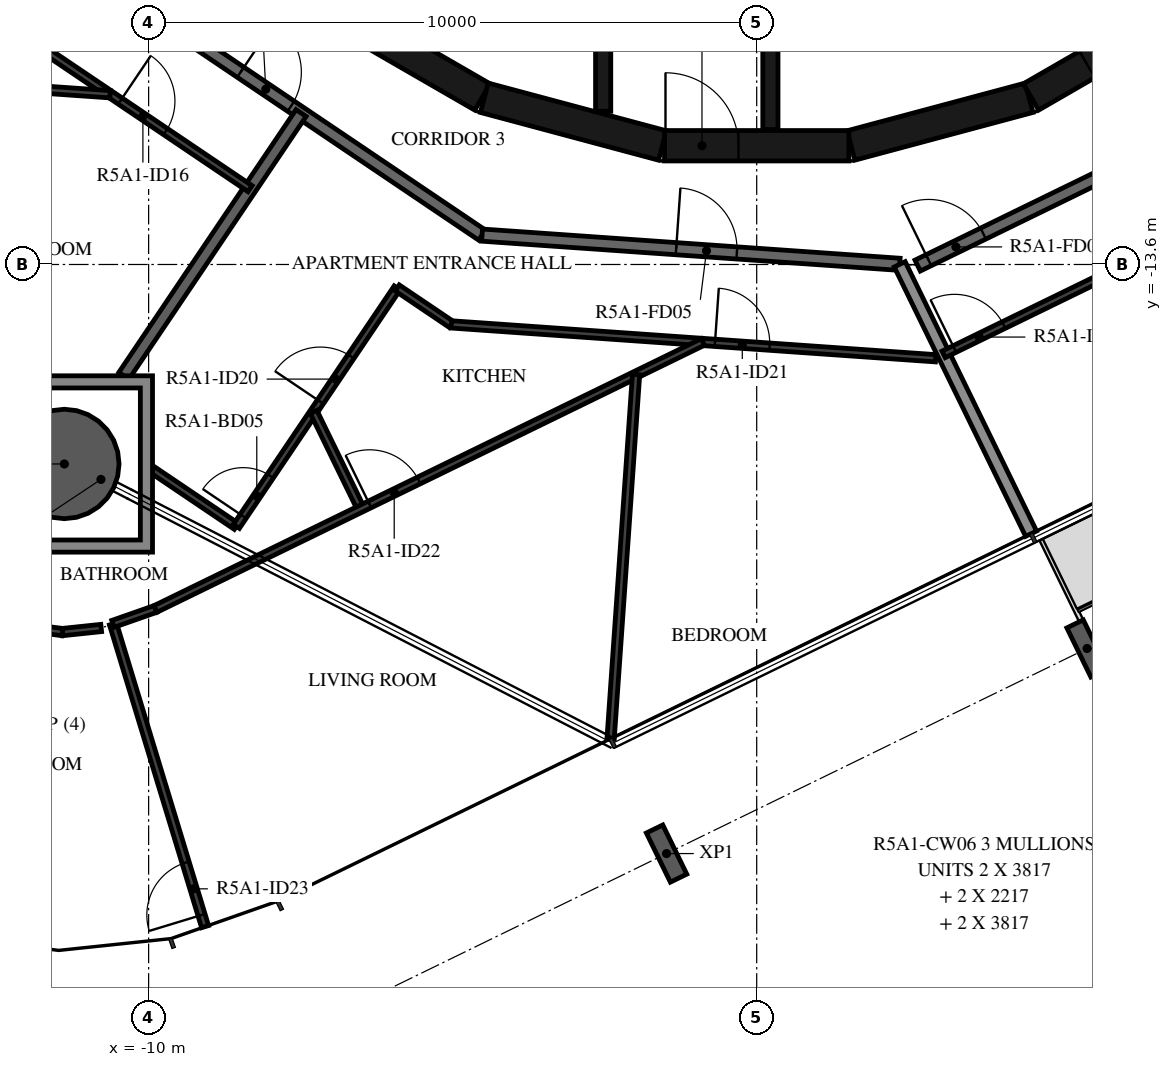
"""IFC4 building model, lengths in metres.
Left out: names, types, materials, properties, quantities, classifications, styles, units other than length and angle.
Written with IfcOpenShell. Run it as: python <this file> out.ifc"""

import sys

from ifc_helpers import new_model, si_unit, direction, frame, frame_2d, origin, origin_2d, place, context, subcontext, project, spatial, polyline, rectangle, hollow_circle, i_section, outline, extrude, element, fill, save


model = new_model("IFC4")
c1 = context("Model", 3, precision=1e-05, world=origin(), true_north=direction((0.0, 1.0)))
c2 = subcontext(c1, "Body", "Model", "MODEL_VIEW")
j1 = project(units=[si_unit("LENGTHUNIT", "METRE"), si_unit("PLANEANGLEUNIT", "RADIAN")], contexts=[c1])
p1 = place(None, origin())
s1 = spatial("IfcSite", under=j1, at=p1, CompositionType="ELEMENT")
p2 = place(p1, origin())
s2 = spatial("IfcBuilding", under=s1, at=p2, CompositionType="ELEMENT")
p3 = place(p2, frame((0.0, 0.0, 191.9)))
s3 = spatial("IfcBuildingStorey", under=s2, at=p3, CompositionType="ELEMENT", Elevation=191.9)
p4 = place(p3, frame((-11.386, -16.881, -0.38), z_axis=(0.0, 0.0, 1.0), x_axis=(1.0, 0.0, 0.0)))
e1 = element("IfcColumn", 1, at=p4, inside=s3, PredefinedType="COLUMN", context=c2, shape_type="SweptSolid", body=[
    extrude(hollow_circle(Radius=0.9, WallThickness=0.04, at=origin_2d()), origin(), (0.0, 0.0, 1.0), 3.5),
])
for number, where, z_axis, x_axis in (
    (2, (-1.482, -23.287, -0.38), (0.0, 0.0, 1.0), (-0.899, -0.438, 0.0)),
    (3, (5.433, -19.915, -0.38), (0.0, 0.0, 1.0), (-0.899, -0.438, 0.0)),
):
    element("IfcColumn", number, at=place(p3, frame(where, z_axis=z_axis, x_axis=x_axis)), inside=s3, PredefinedType="COLUMN", context=c2, shape_type="SweptSolid", body=[
        extrude(i_section(OverallWidth=0.3, OverallDepth=0.9, WebThickness=0.019, FlangeThickness=0.035, FilletRadius=0.03, at=origin_2d()), origin(), (0.0, 0.0, 1.0), 3.5),
    ])
p5 = place(p3, frame((1.55, -11.643, 0.0), z_axis=(0.0, 0.0, 1.0), x_axis=(0.965948410781, 0.258734743916, 0.0)))
e4 = element("IfcWall", 4, at=p5, inside=s3, PredefinedType="SHEAR", context=c2, shape_type="SweptSolid", body=[
    extrude(rectangle(XDim=3.033, YDim=0.5, at=frame_2d((1.516, 0.0))), origin(), (0.0, 0.0, 1.0), 3.12),
])
p6 = place(p3, frame((4.51, -10.845, 0.0), z_axis=(0.0, 0.0, 1.0), x_axis=(0.865975092491, 0.500087131594, 0.0)))
e5 = element("IfcWall", 5, at=p6, inside=s3, PredefinedType="SHEAR", context=c2, shape_type="SweptSolid", body=[
    extrude(rectangle(XDim=3.033, YDim=0.5, at=frame_2d((1.516, 0.0))), origin(), (0.0, 0.0, 1.0), 3.12),
])
p7 = place(p6, frame((1.066, 0.0, 0.0)))
e6 = element("IfcOpeningElement", 6, at=p7, cuts=e5, PredefinedType="OPENING", context=c2, shape_type="SweptSolid", body=[
    extrude(rectangle(XDim=0.9, YDim=2.1, at=frame_2d((0.45, 1.05))), frame((0.0, 0.26, 0.0), z_axis=(0.0, -1.0, 0.0), x_axis=(1.0, 0.0, 0.0)), (0.0, 0.0, 1.0), 0.52),
])
for number, where, z_axis, x_axis in (
    (7, (-7.137, -9.329, 0.0), (0.0, 0.0, 1.0), (0.866, -0.5, 0.0)),
    (8, (-4.479, -10.858, 0.0), (0.0, 0.0, 1.0), (0.966, -0.259, 0.0)),
):
    element("IfcWall", number, at=place(p3, frame(where, z_axis=z_axis, x_axis=x_axis)), inside=s3, PredefinedType="SHEAR", context=c2, shape_type="SweptSolid", body=[
        extrude(rectangle(XDim=3.033, YDim=0.5, at=frame_2d((1.516, 0.0))), origin(), (0.0, 0.0, 1.0), 3.12),
    ])
p8 = place(p3, frame((-1.516, -11.647, 0.0), z_axis=(0.0, 0.0, 1.0), x_axis=(1.0, 0.0, 0.0)))
e9 = element("IfcWall", 9, at=p8, inside=s3, PredefinedType="SHEAR", context=c2, shape_type="SweptSolid", body=[
    extrude(rectangle(XDim=3.033, YDim=0.5, at=frame_2d((1.516, 0.0))), origin(), (0.0, 0.0, 1.0), 3.12),
])
p9 = place(p8, frame((0.016, 0.0, 0.0)))
e10 = element("IfcOpeningElement", 10, at=p9, cuts=e9, PredefinedType="OPENING", context=c2, shape_type="SweptSolid", body=[
    extrude(rectangle(XDim=1.2, YDim=2.1, at=frame_2d((0.6, 1.05))), frame((0.0, 0.26, 0.0), z_axis=(0.0, -1.0, 0.0), x_axis=(1.0, 0.0, 0.0)), (0.0, 0.0, 1.0), 0.52),
])
p10 = place(p3, frame((-2.525, -8.97, 0.0), z_axis=(0.0, 0.0, 1.0), x_axis=(0.0, -1.0, 0.0)))
e11 = element("IfcWall", 11, at=p10, inside=s3, PredefinedType="SHEAR", context=c2, shape_type="SweptSolid", body=[
    extrude(rectangle(XDim=2.11, YDim=0.25, at=frame_2d((1.055, 0.0))), origin(), (0.0, 0.0, 1.0), 3.12),
])
p11 = place(p3, frame((0.225, -8.97, 0.0), z_axis=(0.0, 0.0, 1.0), x_axis=(0.0, -1.0, 0.0)))
e12 = element("IfcWall", 12, at=p11, inside=s3, PredefinedType="SHEAR", context=c2, shape_type="SweptSolid", body=[
    extrude(rectangle(XDim=2.41, YDim=0.25, at=frame_2d((1.205, 0.0))), origin(), (0.0, 0.0, 1.0), 3.12),
])
p12 = place(p3, frame((-10.47, -9.101, 0.0), z_axis=(0.0, 0.0, 1.0), x_axis=(0.829035841718, -0.559195469534, 0.0)))
e13 = element("IfcWall", 13, at=p12, inside=s3, PredefinedType="STANDARD", context=c2, shape_type="SweptSolid", body=[
    extrude(rectangle(XDim=7.181, YDim=0.2, at=frame_2d((3.591, 0.0))), origin(), (0.0, 0.0, 1.0), 3.12),
])
p13 = place(p12, frame((2.39, 0.0, 0.0)))
e14 = element("IfcOpeningElement", 14, at=p13, cuts=e13, PredefinedType="OPENING", context=c2, shape_type="SweptSolid", body=[
    extrude(rectangle(XDim=1.0, YDim=2.1, at=frame_2d((0.5, 1.05))), frame((0.0, 0.11, 0.0), z_axis=(0.0, -1.0, 0.0), x_axis=(1.0, 0.0, 0.0)), (0.0, 0.0, 1.0), 0.22),
])
p14 = place(p3, frame((-4.517, -13.117, 0.0), z_axis=(0.0, 0.0, 1.0), x_axis=(0.997564669554, -0.069747616856, 0.0)))
e15 = element("IfcWall", 15, at=p14, inside=s3, PredefinedType="STANDARD", context=c2, shape_type="SweptSolid", body=[
    extrude(rectangle(XDim=6.885, YDim=0.2, at=frame_2d((3.443, 0.0))), origin(), (0.0, 0.0, 1.0), 3.12),
])
p15 = place(p14, frame((3.2, 0.0, 0.0)))
e16 = element("IfcOpeningElement", 16, at=p15, cuts=e15, PredefinedType="OPENING", context=c2, shape_type="SweptSolid", body=[
    extrude(rectangle(XDim=1.0, YDim=2.1, at=frame_2d((0.5, 1.05))), frame((0.0, 0.11, 0.0), z_axis=(0.0, -1.0, 0.0), x_axis=(1.0, 0.0, 0.0)), (0.0, 0.0, 1.0), 0.22),
])
p16 = place(p3, frame((2.647, -13.618, 0.0), z_axis=(0.0, 0.0, 1.0), x_axis=(0.898796543751, 0.438366026218, 0.0)))
e17 = element("IfcWall", 17, at=p16, inside=s3, PredefinedType="STANDARD", context=c2, shape_type="SweptSolid", body=[
    extrude(rectangle(XDim=7.181, YDim=0.2, at=frame_2d((3.591, 0.0))), origin(), (0.0, 0.0, 1.0), 3.12),
])
p17 = place(p16, frame((0.2, 0.0, 0.0)))
e18 = element("IfcOpeningElement", 18, at=p17, cuts=e17, PredefinedType="OPENING", context=c2, shape_type="SweptSolid", body=[
    extrude(rectangle(XDim=1.0, YDim=2.1, at=frame_2d((0.5, 1.05))), frame((0.0, 0.11, 0.0), z_axis=(0.0, -1.0, 0.0), x_axis=(1.0, 0.0, 0.0)), (0.0, 0.0, 1.0), 0.22),
])
p18 = place(p3, frame((-10.407, -15.43, 0.0), z_axis=(0.0, 0.0, 1.0), x_axis=(0.559038328133, 0.829141813973, 0.0)))
e19 = element("IfcWall", 19, at=p18, inside=s3, PredefinedType="STANDARD", context=c2, shape_type="SweptSolid", body=[
    extrude(rectangle(XDim=5.212, YDim=0.2, at=frame_2d((2.606, 0.0))), origin(), (0.0, 0.0, 1.0), 3.12),
])
p19 = place(p3, frame((4.512, -18.027, 0.0), z_axis=(0.0, 0.0, 1.0), x_axis=(-0.438374835386, 0.898792247241, 0.0)))
e20 = element("IfcWall", 20, at=p19, inside=s3, PredefinedType="STANDARD", context=c2, shape_type="SweptSolid", body=[
    extrude(rectangle(XDim=4.929, YDim=0.2, at=frame_2d((2.464, 0.0))), origin(), (0.0, 0.0, 1.0), 2.73),
])
p20 = place(p3, frame((-11.642, -10.12, 0.0), z_axis=(0.0, 0.0, 1.0), x_axis=(0.829018066952, -0.559221820629, 0.0)))
e21 = element("IfcWall", 21, at=p20, inside=s3, PredefinedType="PARTITIONING", context=c2, shape_type="SweptSolid", body=[
    extrude(rectangle(XDim=3.992, YDim=0.12, at=frame_2d((1.996, 0.0))), origin(), (0.0, 0.0, 1.0), 3.12),
])
p21 = place(p20, frame((1.417, 0.0, 0.0)))
e22 = element("IfcOpeningElement", 22, at=p21, cuts=e21, PredefinedType="OPENING", context=c2, shape_type="SweptSolid", body=[
    extrude(rectangle(XDim=0.9, YDim=2.1, at=frame_2d((0.45, 1.05))), frame((0.0, 0.07, 0.0), z_axis=(0.0, -1.0, 0.0), x_axis=(1.0, 0.0, 0.0)), (0.0, 0.0, 1.0), 0.14),
])
p22 = place(p3, frame((-14.551, -10.527, 0.0), z_axis=(0.0, 0.0, 1.0), x_axis=(0.997564247633, -0.069753651118, 0.0)))
e23 = element("IfcWall", 23, at=p22, inside=s3, PredefinedType="PARTITIONING", context=c2, shape_type="SweptSolid", body=[
    extrude(rectangle(XDim=3.927, YDim=0.12, at=frame_2d((1.963, 0.0))), origin(), (0.0, 0.0, 1.0), 3.12),
])
p23 = place(p3, frame((-9.936, -16.976, 0.0), z_axis=(0.0, 0.0, 1.0), x_axis=(0.829057888835, -0.559162782167, 0.0)))
e24 = element("IfcWall", 24, at=p23, inside=s3, PredefinedType="PARTITIONING", context=c2, shape_type="SweptSolid", body=[
    extrude(rectangle(XDim=1.664, YDim=0.12, at=frame_2d((0.832, 0.0))), origin(), (0.0, 0.0, 1.0), 3.12),
])
p24 = place(p3, frame((-8.557, -17.906, 0.0), z_axis=(0.0, 0.0, 1.0), x_axis=(0.559194471553, 0.829036514868, 0.0)))
e25 = element("IfcWall", 25, at=p24, inside=s3, PredefinedType="PARTITIONING", context=c2, shape_type="SweptSolid", body=[
    extrude(rectangle(XDim=4.73, YDim=0.12, at=frame_2d((2.365, 0.0))), origin(), (0.0, 0.0, 1.0), 3.12),
])
p25 = place(p24, frame((0.2, 0.0, 0.0)))
e26 = element("IfcOpeningElement", 26, at=p25, cuts=e25, PredefinedType="OPENING", context=c2, shape_type="SweptSolid", body=[
    extrude(rectangle(XDim=0.8, YDim=2.1, at=frame_2d((0.4, 1.05))), frame((0.0, 0.07, 0.0), z_axis=(0.0, -1.0, 0.0), x_axis=(1.0, 0.0, 0.0)), (0.0, 0.0, 1.0), 0.14),
])
p26 = place(p24, frame((2.471, 0.0, 0.0)))
e27 = element("IfcOpeningElement", 27, at=p26, cuts=e25, PredefinedType="OPENING", context=c2, shape_type="SweptSolid", body=[
    extrude(rectangle(XDim=0.9, YDim=2.1, at=frame_2d((0.45, 1.05))), frame((0.0, 0.07, 0.0), z_axis=(0.0, -1.0, 0.0), x_axis=(1.0, 0.0, 0.0)), (0.0, 0.0, 1.0), 0.14),
])
p27 = place(p3, frame((-5.912, -13.985, 0.0), z_axis=(0.0, 0.0, 1.0), x_axis=(0.829027978444, -0.559207127062, 0.0)))
e28 = element("IfcWall", 28, at=p27, inside=s3, PredefinedType="PARTITIONING", context=c2, shape_type="SweptSolid", body=[
    extrude(rectangle(XDim=1.073, YDim=0.12, at=frame_2d((0.537, 0.0))), origin(), (0.0, 0.0, 1.0), 3.12),
])
p28 = place(p3, frame((-5.022, -14.585, 0.0), z_axis=(0.0, 0.0, 1.0), x_axis=(0.997565118395, -0.069741197017, 0.0)))
e29 = element("IfcWall", 29, at=p28, inside=s3, PredefinedType="PARTITIONING", context=c2, shape_type="SweptSolid", body=[
    extrude(rectangle(XDim=7.985, YDim=0.12, at=frame_2d((3.993, 0.0))), origin(), (0.0, 0.0, 1.0), 3.12),
])
p29 = place(p28, frame((4.346, 0.0, 0.0)))
e30 = element("IfcOpeningElement", 30, at=p29, cuts=e29, PredefinedType="OPENING", context=c2, shape_type="SweptSolid", body=[
    extrude(rectangle(XDim=0.9, YDim=2.1, at=frame_2d((0.45, 1.05))), frame((0.0, 0.07, 0.0), z_axis=(0.0, -1.0, 0.0), x_axis=(1.0, 0.0, 0.0)), (0.0, 0.0, 1.0), 0.14),
])
p30 = place(p3, frame((-10.78, -19.578, 0.0), z_axis=(0.0, 0.0, 1.0), x_axis=(-0.994515867502, -0.104585798686, 0.0)))
e31 = element("IfcWall", 31, at=p30, inside=s3, PredefinedType="PARTITIONING", context=c2, shape_type="SweptSolid", body=[
    extrude(rectangle(XDim=0.642, YDim=0.12, at=frame_2d((0.321, 0.0))), origin(), (0.0, 0.0, 1.0), 3.12),
])
p31 = place(p3, frame((-11.418, -19.645, 0.0), z_axis=(0.0, 0.0, 1.0), x_axis=(-0.991802759529, 0.127778269633, 0.0)))
e32 = element("IfcWall", 32, at=p31, inside=s3, PredefinedType="PARTITIONING", context=c2, shape_type="SweptSolid", body=[
    extrude(rectangle(XDim=0.642, YDim=0.12, at=frame_2d((0.321, 0.0))), origin(), (0.0, 0.0, 1.0), 3.12),
])
p32 = place(p3, frame((-9.072, -24.489, 0.0), z_axis=(0.0, 0.0, 1.0), x_axis=(-0.291025348593, 0.956715342449, 0.0)))
e33 = element("IfcWall", 33, at=p32, inside=s3, PredefinedType="PARTITIONING", context=c2, shape_type="SweptSolid", body=[
    extrude(rectangle(XDim=5.205, YDim=0.12, at=frame_2d((2.602, 0.0))), origin(), (0.0, 0.0, 1.0), 3.12),
])
p33 = place(p32, frame((0.2, 0.0, 0.0)))
e34 = element("IfcOpeningElement", 34, at=p33, cuts=e33, PredefinedType="OPENING", context=c2, shape_type="SweptSolid", body=[
    extrude(rectangle(XDim=0.9, YDim=2.1, at=frame_2d((0.45, 1.05))), frame((0.0, 0.07, 0.0), z_axis=(0.0, -1.0, 0.0), x_axis=(1.0, 0.0, 0.0)), (0.0, 0.0, 1.0), 0.14),
])
p34 = place(p3, frame((-6.51, -17.617, 0.0), z_axis=(0.0, 0.0, 1.0), x_axis=(-0.438380229518, 0.898789616299, 0.0)))
e35 = element("IfcWall", 35, at=p34, inside=s3, PredefinedType="PARTITIONING", context=c2, shape_type="SweptSolid", body=[
    extrude(rectangle(XDim=1.773, YDim=0.12, at=frame_2d((0.887, 0.0))), origin(), (0.0, 0.0, 1.0), 3.12),
])
p35 = place(p3, frame((-10.586, -19.51, 0.0), z_axis=(0.0, 0.0, 1.0), x_axis=(0.943560277016, 0.3312008509, 0.0)))
e36 = element("IfcWall", 36, at=p35, inside=s3, PredefinedType="PARTITIONING", context=c2, shape_type="SweptSolid", body=[
    extrude(rectangle(XDim=0.741, YDim=0.12, at=frame_2d((0.371, 0.0))), origin(), (0.0, 0.0, 1.0), 3.12),
])
p36 = place(p3, frame((-9.886, -19.264, 0.0), z_axis=(0.0, 0.0, 1.0), x_axis=(0.898796326112, 0.43836647245, 0.0)))
e37 = element("IfcWall", 37, at=p36, inside=s3, PredefinedType="PARTITIONING", context=c2, shape_type="SweptSolid", body=[
    extrude(rectangle(XDim=10.014, YDim=0.12, at=frame_2d((5.007, 0.0))), origin(), (0.0, 0.0, 1.0), 3.12),
])
p37 = place(p36, frame((3.917, 0.0, 0.0)))
e38 = element("IfcOpeningElement", 38, at=p37, cuts=e37, PredefinedType="OPENING", context=c2, shape_type="SweptSolid", body=[
    extrude(rectangle(XDim=0.9, YDim=2.1, at=frame_2d((0.45, 1.05))), frame((0.0, 0.07, 0.0), z_axis=(0.0, -1.0, 0.0), x_axis=(1.0, 0.0, 0.0)), (0.0, 0.0, 1.0), 0.14),
])
p38 = place(p3, frame((-2.403, -21.4, 0.0), z_axis=(0.0, 0.0, 1.0), x_axis=(0.069729998801, 0.997565901215, 0.0)))
e39 = element("IfcWall", 39, at=p38, inside=s3, PredefinedType="PARTITIONING", context=c2, shape_type="SweptSolid", body=[
    extrude(rectangle(XDim=6.005, YDim=0.12, at=frame_2d((3.002, 0.0))), origin(), (0.0, 0.0, 1.0), 3.12),
])
p39 = place(p3, frame((3.074, -15.078, 0.0), z_axis=(0.0, 0.0, 1.0), x_axis=(0.898800770739, 0.438357359377, 0.0)))
e40 = element("IfcWall", 40, at=p39, inside=s3, PredefinedType="PARTITIONING", context=c2, shape_type="SweptSolid", body=[
    extrude(rectangle(XDim=7.694, YDim=0.12, at=frame_2d((3.847, 0.0))), origin(), (0.0, 0.0, 1.0), 3.12),
])
p40 = place(p39, frame((0.2, 0.0, 0.0)))
e41 = element("IfcOpeningElement", 41, at=p40, cuts=e40, PredefinedType="OPENING", context=c2, shape_type="SweptSolid", body=[
    extrude(rectangle(XDim=0.9, YDim=2.1, at=frame_2d((0.45, 1.05))), frame((0.0, 0.07, 0.0), z_axis=(0.0, -1.0, 0.0), x_axis=(1.0, 0.0, 0.0)), (0.0, 0.0, 1.0), 0.14),
])
p41 = place(p3, origin())
e42 = element("IfcWall", 42, at=p41, inside=s3, PredefinedType="STANDARD", context=c2, shape_type="SweptSolid", body=[
    extrude(outline(polyline([(-9.936, -15.43), (-9.936, -18.331), (-12.836, -18.331), (-12.836, -15.43), (-9.936, -15.43)]), holes=[polyline([(-12.636, -18.131), (-10.136, -18.131), (-10.136, -15.631), (-12.636, -15.631), (-12.636, -18.131)])]), origin(), (0.0, 0.0, 1.0), 3.12),
])
p42 = place(p9, origin())
e43 = element("IfcDoor", 43, at=p42, inside=s3, OperationType="SINGLE_SWING_RIGHT", PredefinedType="DOOR", context=c2, shape_type="SweptSolid", body=[
    extrude(rectangle(XDim=1.2, YDim=2.1, at=frame_2d((0.6, 1.05))), frame((0.0, 0.025, 0.0), z_axis=(0.0, -1.0, 0.0), x_axis=(1.0, 0.0, 0.0)), (0.0, 0.0, 1.0), 0.05),
])
fill(e10, e43)
p43 = place(p7, origin())
e44 = element("IfcDoor", 44, at=p43, inside=s3, OperationType="SINGLE_SWING_RIGHT", PredefinedType="DOOR", context=c2, shape_type="SweptSolid", body=[
    extrude(rectangle(XDim=0.9, YDim=2.1, at=frame_2d((0.45, 1.05))), frame((0.0, 0.025, 0.0), z_axis=(0.0, -1.0, 0.0), x_axis=(1.0, 0.0, 0.0)), (0.0, 0.0, 1.0), 0.05),
])
fill(e6, e44)
p44 = place(p13, origin())
e45 = element("IfcDoor", 45, at=p44, inside=s3, OperationType="SINGLE_SWING_RIGHT", PredefinedType="DOOR", context=c2, shape_type="SweptSolid", body=[
    extrude(rectangle(XDim=1.0, YDim=2.1, at=frame_2d((0.5, 1.05))), frame((0.0, 0.025, 0.0), z_axis=(0.0, -1.0, 0.0), x_axis=(1.0, 0.0, 0.0)), (0.0, 0.0, 1.0), 0.05),
])
fill(e14, e45)
p45 = place(p21, origin())
e46 = element("IfcDoor", 46, at=p45, inside=s3, OperationType="SINGLE_SWING_RIGHT", PredefinedType="DOOR", context=c2, shape_type="SweptSolid", body=[
    extrude(rectangle(XDim=0.9, YDim=2.1, at=frame_2d((0.45, 1.05))), frame((0.0, 0.025, 0.0), z_axis=(0.0, -1.0, 0.0), x_axis=(1.0, 0.0, 0.0)), (0.0, 0.0, 1.0), 0.05),
])
fill(e22, e46)
p46 = place(p15, origin())
e47 = element("IfcDoor", 47, at=p46, inside=s3, OperationType="SINGLE_SWING_LEFT", PredefinedType="DOOR", context=c2, shape_type="SweptSolid", body=[
    extrude(rectangle(XDim=1.0, YDim=2.1, at=frame_2d((0.5, 1.05))), frame((0.0, 0.025, 0.0), z_axis=(0.0, -1.0, 0.0), x_axis=(1.0, 0.0, 0.0)), (0.0, 0.0, 1.0), 0.05),
])
fill(e16, e47)
p47 = place(p25, origin())
e48 = element("IfcDoor", 48, at=p47, inside=s3, OperationType="SINGLE_SWING_LEFT", PredefinedType="DOOR", context=c2, shape_type="SweptSolid", body=[
    extrude(rectangle(XDim=0.8, YDim=2.1, at=frame_2d((0.4, 1.05))), frame((0.0, 0.025, 0.0), z_axis=(0.0, -1.0, 0.0), x_axis=(1.0, 0.0, 0.0)), (0.0, 0.0, 1.0), 0.05),
])
fill(e26, e48)
p48 = place(p26, origin())
e49 = element("IfcDoor", 49, at=p48, inside=s3, OperationType="SINGLE_SWING_LEFT", PredefinedType="DOOR", context=c2, shape_type="SweptSolid", body=[
    extrude(rectangle(XDim=0.9, YDim=2.1, at=frame_2d((0.45, 1.05))), frame((0.0, 0.025, 0.0), z_axis=(0.0, -1.0, 0.0), x_axis=(1.0, 0.0, 0.0)), (0.0, 0.0, 1.0), 0.05),
])
fill(e27, e49)
p49 = place(p29, origin())
e50 = element("IfcDoor", 50, at=p49, inside=s3, OperationType="SINGLE_SWING_LEFT", PredefinedType="DOOR", context=c2, shape_type="SweptSolid", body=[
    extrude(rectangle(XDim=0.9, YDim=2.1, at=frame_2d((0.45, 1.05))), frame((0.0, 0.025, 0.0), z_axis=(0.0, -1.0, 0.0), x_axis=(1.0, 0.0, 0.0)), (0.0, 0.0, 1.0), 0.05),
])
fill(e30, e50)
p50 = place(p37, origin())
e51 = element("IfcDoor", 51, at=p50, inside=s3, OperationType="SINGLE_SWING_LEFT", PredefinedType="DOOR", context=c2, shape_type="SweptSolid", body=[
    extrude(rectangle(XDim=0.9, YDim=2.1, at=frame_2d((0.45, 1.05))), frame((0.0, 0.025, 0.0), z_axis=(0.0, -1.0, 0.0), x_axis=(1.0, 0.0, 0.0)), (0.0, 0.0, 1.0), 0.05),
])
fill(e38, e51)
p51 = place(p33, origin())
e52 = element("IfcDoor", 52, at=p51, inside=s3, OperationType="SINGLE_SWING_LEFT", PredefinedType="DOOR", context=c2, shape_type="SweptSolid", body=[
    extrude(rectangle(XDim=0.9, YDim=2.1, at=frame_2d((0.45, 1.05))), frame((0.0, 0.025, 0.0), z_axis=(0.0, -1.0, 0.0), x_axis=(1.0, 0.0, 0.0)), (0.0, 0.0, 1.0), 0.05),
])
fill(e34, e52)
p52 = place(p17, origin())
e53 = element("IfcDoor", 53, at=p52, inside=s3, OperationType="SINGLE_SWING_LEFT", PredefinedType="DOOR", context=c2, shape_type="SweptSolid", body=[
    extrude(rectangle(XDim=1.0, YDim=2.1, at=frame_2d((0.5, 1.05))), frame((0.0, 0.025, 0.0), z_axis=(0.0, -1.0, 0.0), x_axis=(1.0, 0.0, 0.0)), (0.0, 0.0, 1.0), 0.05),
])
fill(e18, e53)
p53 = place(p40, origin())
e54 = element("IfcDoor", 54, at=p53, inside=s3, OperationType="SINGLE_SWING_LEFT", PredefinedType="DOOR", context=c2, shape_type="SweptSolid", body=[
    extrude(rectangle(XDim=0.9, YDim=2.1, at=frame_2d((0.45, 1.05))), frame((0.0, 0.025, 0.0), z_axis=(0.0, -1.0, 0.0), x_axis=(1.0, 0.0, 0.0)), (0.0, 0.0, 1.0), 0.05),
])
fill(e41, e54)
save(model, sys.argv[1])
